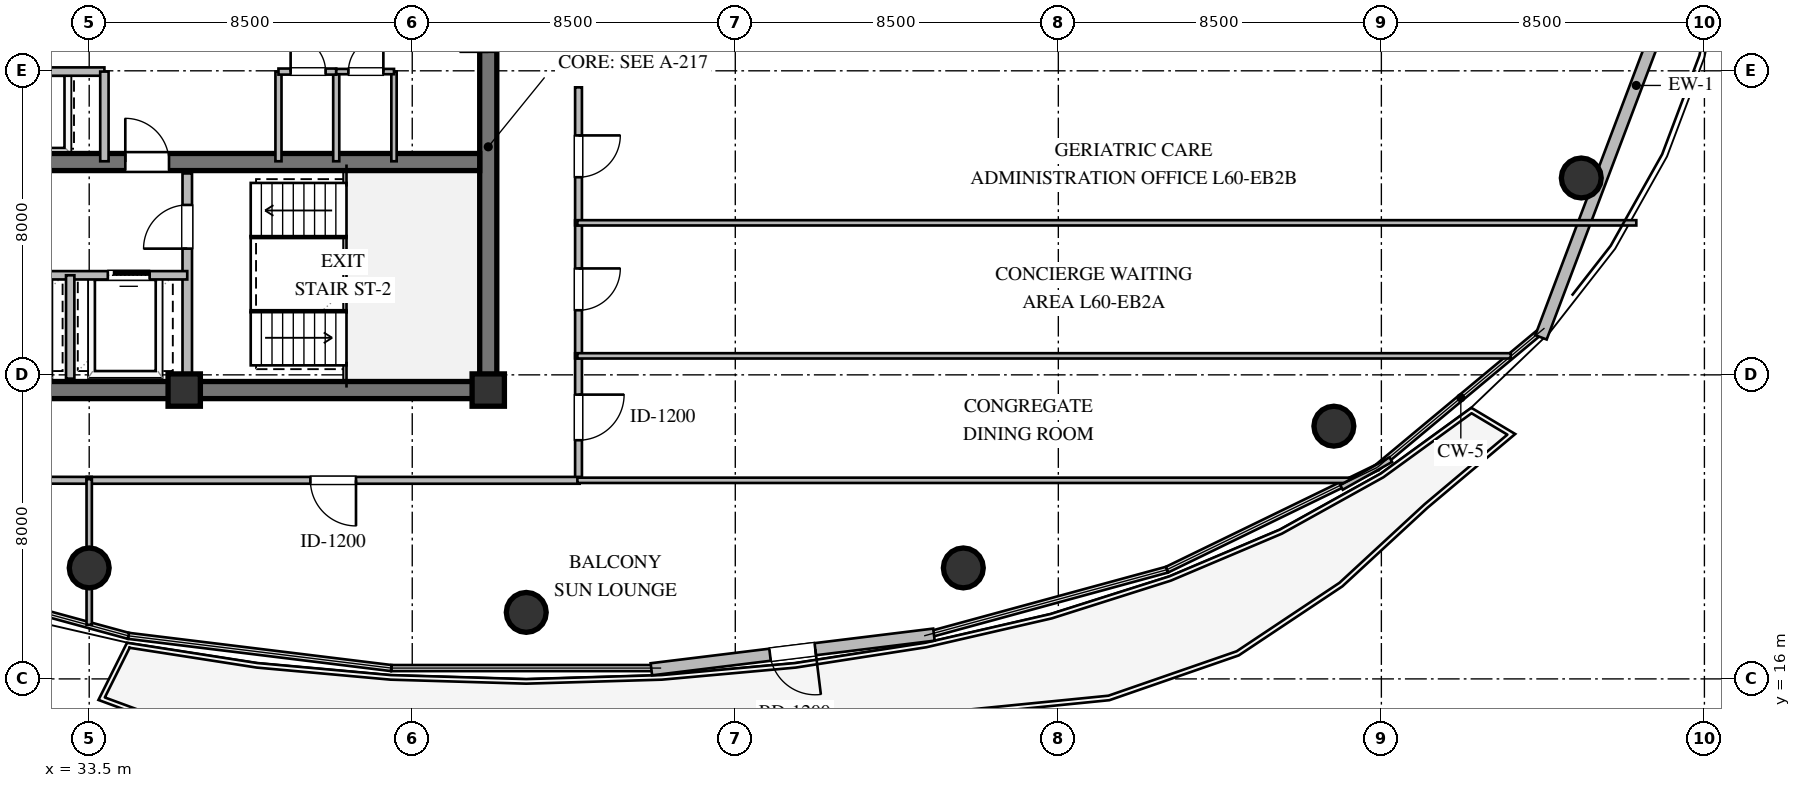
"""IFC4 building model, lengths in metres.
Left out: names, types, materials, properties, quantities, classifications, styles, units other than length and angle.
Written with IfcOpenShell. Run it as: python <this file> out.ifc"""

import sys

from ifc_helpers import new_model, si_unit, direction, frame, frame_2d, origin, origin_2d, place, context, subcontext, project, spatial, rectangle, circle, extrude, element, fill, save


model = new_model("IFC4")
c1 = context("Model", 3, precision=1e-05, world=origin(), true_north=direction((0.0, 1.0)))
c2 = subcontext(c1, "Body", "Model", "MODEL_VIEW")
j1 = project(units=[si_unit("LENGTHUNIT", "METRE"), si_unit("PLANEANGLEUNIT", "RADIAN")], contexts=[c1])
p1 = place(None, origin())
s1 = spatial("IfcSite", under=j1, at=p1, CompositionType="ELEMENT")
p2 = place(p1, origin())
s2 = spatial("IfcBuilding", under=s1, at=p2, CompositionType="ELEMENT")
p3 = place(p2, frame((0.0, 0.0, 228.0)))
s3 = spatial("IfcBuildingStorey", under=s2, at=p3, CompositionType="ELEMENT", Elevation=228.0)
p4 = place(p3, frame((21.775, 23.6, 0.0), z_axis=(0.0, 0.0, 1.0), x_axis=(1.0, 0.0, 0.0)))
e1 = element("IfcWall", 1, at=p4, inside=s3, PredefinedType="SHEAR", context=c2, shape_type="SweptSolid", body=[
    extrude(rectangle(XDim=22.45, YDim=0.45, at=frame_2d((11.225, 0.0))), origin(), (0.0, 0.0, 1.0), 3.36),
])
p5 = place(p3, frame((44.0, 23.825, 0.0), z_axis=(0.0, 0.0, 1.0), x_axis=(0.0, 1.0, 0.0)))
e2 = element("IfcWall", 2, at=p5, inside=s3, PredefinedType="SHEAR", context=c2, shape_type="SweptSolid", body=[
    extrude(rectangle(XDim=12.35, YDim=0.45, at=frame_2d((6.175, 0.0))), origin(), (0.0, 0.0, 1.0), 3.36),
])
p6 = place(p5, frame((8.675, 0.0, 0.0)))
e3 = element("IfcOpeningElement", 3, at=p6, cuts=e2, PredefinedType="OPENING", context=c2, shape_type="SweptSolid", body=[
    extrude(rectangle(XDim=1.5, YDim=2.15, at=frame_2d((0.75, 1.075))), frame((0.0, 0.235, 0.0), z_axis=(0.0, -1.0, 0.0), x_axis=(1.0, 0.0, 0.0)), (0.0, 0.0, 1.0), 0.47),
])
p7 = place(p3, frame((22.225, 29.6, 0.0), z_axis=(0.0, 0.0, 1.0), x_axis=(1.0, 0.0, 0.0)))
e4 = element("IfcWall", 4, at=p7, inside=s3, PredefinedType="SHEAR", context=c2, shape_type="SweptSolid", body=[
    extrude(rectangle(XDim=21.55, YDim=0.45, at=frame_2d((10.775, 0.0))), origin(), (0.0, 0.0, 1.0), 3.36),
])
p8 = place(p7, frame((12.225, 0.0, 0.0)))
e5 = element("IfcOpeningElement", 5, at=p8, cuts=e4, PredefinedType="OPENING", context=c2, shape_type="SweptSolid", body=[
    extrude(rectangle(XDim=1.15, YDim=2.1, at=frame_2d((0.575, 1.05))), frame((0.0, 0.235, 0.0), z_axis=(0.0, -1.0, 0.0), x_axis=(1.0, 0.0, 0.0)), (0.0, 0.0, 1.0), 0.47),
])
for number, where, z_axis, x_axis in (
    (6, (36.0, 23.6, 0.0), (0.0, 0.0, 1.0), (1.0, 0.0, 0.0)),
    (7, (44.0, 23.6, 0.0), (0.0, 0.0, 1.0), (1.0, 0.0, 0.0)),
):
    element("IfcColumn", number, at=place(p3, frame(where, z_axis=z_axis, x_axis=x_axis)), inside=s3, PredefinedType="COLUMN", context=c2, shape_type="SweptSolid", body=[
        extrude(rectangle(XDim=0.85, YDim=0.85, at=origin_2d()), origin(), (0.0, 0.0, 1.0), 3.6),
    ])
for number, where, z_axis, x_axis in (
    (8, (33.5, 18.92, 0.0), (0.0, 0.0, 1.0), (1.0, 0.0, 0.0)),
    (9, (45.0, 17.75, 0.0), (0.0, 0.0, 1.0), (1.0, 0.0, 0.0)),
    (10, (56.5, 18.92, 0.0), (0.0, 0.0, 1.0), (1.0, 0.0, 0.0)),
    (11, (66.25, 22.65, 0.0), (0.0, 0.0, 1.0), (1.0, 0.0, 0.0)),
    (12, (72.76, 29.18, 0.0), (0.0, 0.0, 1.0), (1.0, 0.0, 0.0)),
):
    element("IfcColumn", number, at=place(p3, frame(where, z_axis=z_axis, x_axis=x_axis)), inside=s3, PredefinedType="COLUMN", context=c2, shape_type="SweptSolid", body=[
        extrude(circle(Radius=0.525, at=origin_2d()), origin(), (0.0, 0.0, 1.0), 3.6),
    ])
p9 = place(p3, frame((76.712, 38.243, 0.0), z_axis=(0.0, 0.0, 1.0), x_axis=(-0.353659523244, -0.935374225441, 0.0)))
e13 = element("IfcWall", 13, at=p9, inside=s3, PredefinedType="STANDARD", context=c2, shape_type="SweptSolid", body=[
    extrude(rectangle(XDim=14.172, YDim=0.32, at=frame_2d((7.086, 0.0))), origin(), (0.0, 0.0, 1.0), 3.36),
])
p10 = place(p3, frame((55.727, 17.165, 0.0), z_axis=(0.0, 0.0, 1.0), x_axis=(-0.992559081031, -0.121763995755, 0.0)))
e14 = element("IfcWall", 14, at=p10, inside=s3, PredefinedType="STANDARD", context=c2, shape_type="SweptSolid", body=[
    extrude(rectangle(XDim=7.491, YDim=0.32, at=frame_2d((3.745, 0.0))), origin(), (0.0, 0.0, 1.0), 3.36),
])
p11 = place(p10, frame((3.145, 0.0, 0.0)))
e15 = element("IfcOpeningElement", 15, at=p11, cuts=e14, PredefinedType="OPENING", context=c2, shape_type="SweptSolid", body=[
    extrude(rectangle(XDim=1.2, YDim=2.15, at=frame_2d((0.6, 1.075))), frame((0.0, 0.17, 0.0), z_axis=(0.0, -1.0, 0.0), x_axis=(1.0, 0.0, 0.0)), (0.0, 0.0, 1.0), 0.34),
])
p12 = place(p3, frame((36.08, 23.9, 0.0), z_axis=(0.0, 0.0, 1.0), x_axis=(0.0, 1.0, 0.0)))
e16 = element("IfcWall", 16, at=p12, inside=s3, PredefinedType="SOLIDWALL", context=c2, shape_type="SweptSolid", body=[
    extrude(rectangle(XDim=5.4, YDim=0.25, at=frame_2d((2.7, 0.0))), origin(), (0.0, 0.0, 1.0), 3.36),
])
p13 = place(p12, frame((3.421, 0.0, 0.0)))
e17 = element("IfcOpeningElement", 17, at=p13, cuts=e16, PredefinedType="OPENING", context=c2, shape_type="SweptSolid", body=[
    extrude(rectangle(XDim=1.15, YDim=2.1, at=frame_2d((0.575, 1.05))), frame((0.0, 0.135, 0.0), z_axis=(0.0, -1.0, 0.0), x_axis=(1.0, 0.0, 0.0)), (0.0, 0.0, 1.0), 0.27),
])
p14 = place(p3, frame((29.92, 26.62, 0.0), z_axis=(0.0, 0.0, 1.0), x_axis=(1.0, 0.0, 0.0)))
e18 = element("IfcWall", 18, at=p14, inside=s3, PredefinedType="SOLIDWALL", context=c2, shape_type="SweptSolid", body=[
    extrude(rectangle(XDim=6.16, YDim=0.22, at=frame_2d((3.08, 0.0))), origin(), (0.0, 0.0, 1.0), 3.36),
])
p15 = place(p14, frame((0.99, 0.0, 0.0)))
e19 = element("IfcOpeningElement", 19, at=p15, cuts=e18, PredefinedType="OPENING", context=c2, shape_type="SweptSolid", body=[
    extrude(rectangle(XDim=1.1, YDim=2.1, at=frame_2d((0.55, 1.05))), frame((0.0, 0.12, 0.0), z_axis=(0.0, -1.0, 0.0), x_axis=(1.0, 0.0, 0.0)), (0.0, 0.0, 1.0), 0.24),
])
p16 = place(p14, frame((4.07, 0.0, 0.0)))
e20 = element("IfcOpeningElement", 20, at=p16, cuts=e18, PredefinedType="OPENING", context=c2, shape_type="SweptSolid", body=[
    extrude(rectangle(XDim=1.1, YDim=2.1, at=frame_2d((0.55, 1.05))), frame((0.0, 0.12, 0.0), z_axis=(0.0, -1.0, 0.0), x_axis=(1.0, 0.0, 0.0)), (0.0, 0.0, 1.0), 0.24),
])
p17 = place(p3, frame((33.0, 23.9, 0.0), z_axis=(0.0, 0.0, 1.0), x_axis=(0.0, 1.0, 0.0)))
e21 = element("IfcWall", 21, at=p17, inside=s3, PredefinedType="SOLIDWALL", context=c2, shape_type="SweptSolid", body=[
    extrude(rectangle(XDim=2.72, YDim=0.22, at=frame_2d((1.36, 0.0))), origin(), (0.0, 0.0, 1.0), 3.36),
])
p18 = place(p3, frame((26.1, 31.98, 0.0), z_axis=(0.0, 0.0, 1.0), x_axis=(1.0, 0.0, 0.0)))
e22 = element("IfcWall", 22, at=p18, inside=s3, PredefinedType="SOLIDWALL", context=c2, shape_type="SweptSolid", body=[
    extrude(rectangle(XDim=7.8, YDim=0.22, at=frame_2d((3.9, 0.0))), origin(), (0.0, 0.0, 1.0), 3.36),
])
p19 = place(p18, frame((1.4, 0.0, 0.0)))
e23 = element("IfcOpeningElement", 23, at=p19, cuts=e22, PredefinedType="OPENING", context=c2, shape_type="SweptSolid", body=[
    extrude(rectangle(XDim=1.1, YDim=2.1, at=frame_2d((0.55, 1.05))), frame((0.0, 0.12, 0.0), z_axis=(0.0, -1.0, 0.0), x_axis=(1.0, 0.0, 0.0)), (0.0, 0.0, 1.0), 0.24),
])
p20 = place(p18, frame((5.066, 0.0, 0.0)))
e24 = element("IfcOpeningElement", 24, at=p20, cuts=e22, PredefinedType="OPENING", context=c2, shape_type="SweptSolid", body=[
    extrude(rectangle(XDim=1.1, YDim=2.1, at=frame_2d((0.55, 1.05))), frame((0.0, 0.12, 0.0), z_axis=(0.0, -1.0, 0.0), x_axis=(1.0, 0.0, 0.0)), (0.0, 0.0, 1.0), 0.24),
])
p21 = place(p3, frame((33.9, 29.62, 0.0), z_axis=(0.0, 0.0, 1.0), x_axis=(0.0, 1.0, 0.0)))
e25 = element("IfcWall", 25, at=p21, inside=s3, PredefinedType="SOLIDWALL", context=c2, shape_type="SweptSolid", body=[
    extrude(rectangle(XDim=2.36, YDim=0.22, at=frame_2d((1.18, 0.0))), origin(), (0.0, 0.0, 1.0), 3.36),
])
for number, where, z_axis, x_axis in (
    (26, (38.48, 29.62, 0.0), (0.0, 0.0, 1.0), (0.0, 1.0, 0.0)),
    (27, (40.0, 29.62, 0.0), (0.0, 0.0, 1.0), (0.0, 1.0, 0.0)),
):
    element("IfcWall", number, at=place(p3, frame(where, z_axis=z_axis, x_axis=x_axis)), inside=s3, PredefinedType="PLUMBINGWALL", context=c2, shape_type="SweptSolid", body=[
        extrude(rectangle(XDim=2.36, YDim=0.16, at=frame_2d((1.18, 0.0))), origin(), (0.0, 0.0, 1.0), 3.36),
    ])
p22 = place(p3, frame((41.52, 29.62, 0.0), z_axis=(0.0, 0.0, 1.0), x_axis=(0.0, 1.0, 0.0)))
e28 = element("IfcWall", 28, at=p22, inside=s3, PredefinedType="PARTITIONING", context=c2, shape_type="SweptSolid", body=[
    extrude(rectangle(XDim=2.36, YDim=0.14, at=frame_2d((1.18, 0.0))), origin(), (0.0, 0.0, 1.0), 3.36),
])
p23 = place(p3, frame((38.48, 31.98, 0.0), z_axis=(0.0, 0.0, 1.0), x_axis=(1.0, 0.0, 0.0)))
e29 = element("IfcWall", 29, at=p23, inside=s3, PredefinedType="PLUMBINGWALL", context=c2, shape_type="SweptSolid", body=[
    extrude(rectangle(XDim=1.52, YDim=0.16, at=frame_2d((0.76, 0.0))), origin(), (0.0, 0.0, 1.0), 3.36),
])
p24 = place(p23, frame((0.32, 0.0, 0.0)))
e30 = element("IfcOpeningElement", 30, at=p24, cuts=e29, PredefinedType="OPENING", context=c2, shape_type="SweptSolid", body=[
    extrude(rectangle(XDim=0.92, YDim=2.1, at=frame_2d((0.46, 1.05))), frame((0.0, 0.09, 0.0), z_axis=(0.0, -1.0, 0.0), x_axis=(1.0, 0.0, 0.0)), (0.0, 0.0, 1.0), 0.18),
])
p25 = place(p3, frame((40.0, 31.98, 0.0), z_axis=(0.0, 0.0, 1.0), x_axis=(1.0, 0.0, 0.0)))
e31 = element("IfcWall", 31, at=p25, inside=s3, PredefinedType="PARTITIONING", context=c2, shape_type="SweptSolid", body=[
    extrude(rectangle(XDim=1.52, YDim=0.14, at=frame_2d((0.76, 0.0))), origin(), (0.0, 0.0, 1.0), 3.36),
])
p26 = place(p25, frame((0.32, 0.0, 0.0)))
e32 = element("IfcOpeningElement", 32, at=p26, cuts=e31, PredefinedType="OPENING", context=c2, shape_type="SweptSolid", body=[
    extrude(rectangle(XDim=0.92, YDim=2.1, at=frame_2d((0.46, 1.05))), frame((0.0, 0.08, 0.0), z_axis=(0.0, -1.0, 0.0), x_axis=(1.0, 0.0, 0.0)), (0.0, 0.0, 1.0), 0.16),
])
p27 = place(p3, frame((46.375, 24.565, 0.0), z_axis=(0.0, 0.0, 1.0), x_axis=(0.0, -1.0, 0.0)))
e33 = element("IfcWall", 33, at=p27, inside=s3, PredefinedType="PARTITIONING", context=c2, shape_type="SweptSolid", body=[
    extrude(rectangle(XDim=3.37, YDim=0.18, at=frame_2d((1.685, 0.0))), origin(), (0.0, 0.0, 1.0), 3.36),
])
p28 = place(p27, frame((1.085, 0.0, 0.0)))
e34 = element("IfcOpeningElement", 34, at=p28, cuts=e33, PredefinedType="OPENING", context=c2, shape_type="SweptSolid", body=[
    extrude(rectangle(XDim=1.2, YDim=2.15, at=frame_2d((0.6, 1.075))), frame((0.0, 0.1, 0.0), z_axis=(0.0, -1.0, 0.0), x_axis=(1.0, 0.0, 0.0)), (0.0, 0.0, 1.0), 0.2),
])
p29 = place(p3, frame((46.375, 28.065, 0.0), z_axis=(0.0, 0.0, 1.0), x_axis=(0.0, -1.0, 0.0)))
e35 = element("IfcWall", 35, at=p29, inside=s3, PredefinedType="PARTITIONING", context=c2, shape_type="SweptSolid", body=[
    extrude(rectangle(XDim=3.63, YDim=0.18, at=frame_2d((1.815, 0.0))), origin(), (0.0, 0.0, 1.0), 3.36),
])
p30 = place(p29, frame((1.265, 0.0, 0.0)))
e36 = element("IfcOpeningElement", 36, at=p30, cuts=e35, PredefinedType="OPENING", context=c2, shape_type="SweptSolid", body=[
    extrude(rectangle(XDim=1.1, YDim=2.1, at=frame_2d((0.55, 1.05))), frame((0.0, 0.1, 0.0), z_axis=(0.0, -1.0, 0.0), x_axis=(1.0, 0.0, 0.0)), (0.0, 0.0, 1.0), 0.2),
])
p31 = place(p3, frame((46.375, 31.565, 0.0), z_axis=(0.0, 0.0, 1.0), x_axis=(0.0, -1.0, 0.0)))
e37 = element("IfcWall", 37, at=p31, inside=s3, PredefinedType="PARTITIONING", context=c2, shape_type="SweptSolid", body=[
    extrude(rectangle(XDim=3.63, YDim=0.18, at=frame_2d((1.815, 0.0))), origin(), (0.0, 0.0, 1.0), 3.36),
])
p32 = place(p31, frame((1.265, 0.0, 0.0)))
e38 = element("IfcOpeningElement", 38, at=p32, cuts=e37, PredefinedType="OPENING", context=c2, shape_type="SweptSolid", body=[
    extrude(rectangle(XDim=1.1, YDim=2.1, at=frame_2d((0.55, 1.05))), frame((0.0, 0.1, 0.0), z_axis=(0.0, -1.0, 0.0), x_axis=(1.0, 0.0, 0.0)), (0.0, 0.0, 1.0), 0.2),
])
p33 = place(p3, frame((33.565, 21.225, 0.0), z_axis=(0.0, 0.0, 1.0), x_axis=(-0.999998619279, 0.001661758222, 0.0)))
e39 = element("IfcWall", 39, at=p33, inside=s3, PredefinedType="PARTITIONING", context=c2, shape_type="SweptSolid", body=[
    extrude(rectangle(XDim=10.284, YDim=0.18, at=frame_2d((5.142, 0.0))), origin(), (0.0, 0.0, 1.0), 2.806),
])
p34 = place(p33, frame((6.229, 0.0, 0.0)))
e40 = element("IfcOpeningElement", 40, at=p34, cuts=e39, PredefinedType="OPENING", context=c2, shape_type="SweptSolid", body=[
    extrude(rectangle(XDim=1.1, YDim=2.1, at=frame_2d((0.55, 1.05))), frame((0.0, 0.1, 0.0), z_axis=(0.0, -1.0, 0.0), x_axis=(1.0, 0.0, 0.0)), (0.0, 0.0, 1.0), 0.2),
])
p35 = place(p3, frame((46.405, 21.225, 0.0), z_axis=(0.0, 0.0, 1.0), x_axis=(-1.0, 0.0, 0.0)))
e41 = element("IfcWall", 41, at=p35, inside=s3, PredefinedType="PARTITIONING", context=c2, shape_type="SweptSolid", body=[
    extrude(rectangle(XDim=12.97, YDim=0.18, at=frame_2d((6.485, 0.0))), origin(), (0.0, 0.0, 1.0), 2.996),
])
p36 = place(p35, frame((5.885, 0.0, 0.0)))
e42 = element("IfcOpeningElement", 42, at=p36, cuts=e41, PredefinedType="OPENING", context=c2, shape_type="SweptSolid", body=[
    extrude(rectangle(XDim=1.2, YDim=2.15, at=frame_2d((0.6, 1.075))), frame((0.0, 0.1, 0.0), z_axis=(0.0, -1.0, 0.0), x_axis=(1.0, 0.0, 0.0)), (0.0, 0.0, 1.0), 0.2),
])
p37 = place(p3, frame((46.345, 24.5, 0.0), z_axis=(0.0, 0.0, 1.0), x_axis=(1.0, 0.0, 0.0)))
e43 = element("IfcWall", 43, at=p37, inside=s3, PredefinedType="PARTITIONING", context=c2, shape_type="SweptSolid", body=[
    extrude(rectangle(XDim=24.561, YDim=0.14, at=frame_2d((12.28, 0.0))), origin(), (0.0, 0.0, 1.0), 2.806),
])
p38 = place(p3, frame((66.684, 21.225, 0.0), z_axis=(0.0, 0.0, 1.0), x_axis=(-1.0, 0.0, 0.0)))
e44 = element("IfcWall", 44, at=p38, inside=s3, PredefinedType="PARTITIONING", context=c2, shape_type="SweptSolid", body=[
    extrude(rectangle(XDim=20.339, YDim=0.14, at=frame_2d((10.169, 0.0))), origin(), (0.0, 0.0, 1.0), 2.996),
])
p39 = place(p3, frame((67.748, 21.77, 0.0), z_axis=(0.0, 0.0, 1.0), x_axis=(-0.871352238731, -0.490658003153, 0.0)))
e45 = element("IfcWall", 45, at=p39, inside=s3, PredefinedType="PARTITIONING", context=c2, shape_type="SweptSolid", body=[
    extrude(rectangle(XDim=1.49, YDim=0.14, at=frame_2d((0.745, 0.0))), origin(), (0.0, 0.0, 1.0), 3.36),
])
p40 = place(p3, frame((46.345, 28.0, 0.0), z_axis=(0.0, 0.0, 1.0), x_axis=(1.0, 0.0, 0.0)))
e46 = element("IfcWall", 46, at=p40, inside=s3, PredefinedType="PARTITIONING", context=c2, shape_type="SweptSolid", body=[
    extrude(rectangle(XDim=27.863, YDim=0.14, at=frame_2d((13.932, 0.0))), origin(), (0.0, 0.0, 1.0), 2.806),
])
p41 = place(p3, frame((33.5, 21.255, 0.0), z_axis=(0.0, 0.0, 1.0), x_axis=(0.0, -1.0, 0.0)))
e47 = element("IfcWall", 47, at=p41, inside=s3, PredefinedType="PARTITIONING", context=c2, shape_type="SweptSolid", body=[
    extrude(rectangle(XDim=3.831, YDim=0.14, at=frame_2d((1.916, 0.0))), origin(), (0.0, 0.0, 1.0), 3.36),
])
p42 = place(p11, origin())
e48 = element("IfcDoor", 48, at=p42, inside=s3, OperationType="SINGLE_SWING_LEFT", PredefinedType="DOOR", context=c2, shape_type="SweptSolid", body=[
    extrude(rectangle(XDim=1.2, YDim=2.15, at=frame_2d((0.6, 1.075))), frame((0.0, 0.025, 0.0), z_axis=(0.0, -1.0, 0.0), x_axis=(1.0, 0.0, 0.0)), (0.0, 0.0, 1.0), 0.05),
])
fill(e15, e48)
p43 = place(p13, origin())
e49 = element("IfcDoor", 49, at=p43, inside=s3, OperationType="SINGLE_SWING_LEFT", PredefinedType="DOOR", context=c2, shape_type="SweptSolid", body=[
    extrude(rectangle(XDim=1.15, YDim=2.1, at=frame_2d((0.575, 1.05))), frame((0.0, 0.025, 0.0), z_axis=(0.0, -1.0, 0.0), x_axis=(1.0, 0.0, 0.0)), (0.0, 0.0, 1.0), 0.05),
])
fill(e17, e49)
p44 = place(p16, origin())
e50 = element("IfcDoor", 50, at=p44, inside=s3, OperationType="SLIDING_TO_RIGHT", PredefinedType="DOOR", context=c2, shape_type="SweptSolid", body=[
    extrude(rectangle(XDim=1.1, YDim=2.1, at=frame_2d((0.55, 1.05))), frame((0.0, 0.025, 0.0), z_axis=(0.0, -1.0, 0.0), x_axis=(1.0, 0.0, 0.0)), (0.0, 0.0, 1.0), 0.05),
])
fill(e20, e50)
p45 = place(p8, origin())
e51 = element("IfcDoor", 51, at=p45, inside=s3, OperationType="SINGLE_SWING_LEFT", PredefinedType="DOOR", context=c2, shape_type="SweptSolid", body=[
    extrude(rectangle(XDim=1.15, YDim=2.1, at=frame_2d((0.575, 1.05))), frame((0.0, 0.025, 0.0), z_axis=(0.0, -1.0, 0.0), x_axis=(1.0, 0.0, 0.0)), (0.0, 0.0, 1.0), 0.05),
])
fill(e5, e51)
p46 = place(p24, origin())
e52 = element("IfcDoor", 52, at=p46, inside=s3, OperationType="SINGLE_SWING_LEFT", PredefinedType="DOOR", context=c2, shape_type="SweptSolid", body=[
    extrude(rectangle(XDim=0.92, YDim=2.1, at=frame_2d((0.46, 1.05))), frame((0.0, 0.025, 0.0), z_axis=(0.0, -1.0, 0.0), x_axis=(1.0, 0.0, 0.0)), (0.0, 0.0, 1.0), 0.05),
])
fill(e30, e52)
p47 = place(p26, origin())
e53 = element("IfcDoor", 53, at=p47, inside=s3, OperationType="SINGLE_SWING_RIGHT", PredefinedType="DOOR", context=c2, shape_type="SweptSolid", body=[
    extrude(rectangle(XDim=0.92, YDim=2.1, at=frame_2d((0.46, 1.05))), frame((0.0, 0.025, 0.0), z_axis=(0.0, -1.0, 0.0), x_axis=(1.0, 0.0, 0.0)), (0.0, 0.0, 1.0), 0.05),
])
fill(e32, e53)
p48 = place(p28, origin())
e54 = element("IfcDoor", 54, at=p48, inside=s3, OperationType="SINGLE_SWING_LEFT", PredefinedType="DOOR", context=c2, shape_type="SweptSolid", body=[
    extrude(rectangle(XDim=1.2, YDim=2.15, at=frame_2d((0.6, 1.075))), frame((0.0, 0.025, 0.0), z_axis=(0.0, -1.0, 0.0), x_axis=(1.0, 0.0, 0.0)), (0.0, 0.0, 1.0), 0.05),
])
fill(e34, e54)
p49 = place(p30, origin())
e55 = element("IfcDoor", 55, at=p49, inside=s3, OperationType="SINGLE_SWING_LEFT", PredefinedType="DOOR", context=c2, shape_type="SweptSolid", body=[
    extrude(rectangle(XDim=1.1, YDim=2.1, at=frame_2d((0.55, 1.05))), frame((0.0, 0.025, 0.0), z_axis=(0.0, -1.0, 0.0), x_axis=(1.0, 0.0, 0.0)), (0.0, 0.0, 1.0), 0.05),
])
fill(e36, e55)
p50 = place(p32, origin())
e56 = element("IfcDoor", 56, at=p50, inside=s3, OperationType="SINGLE_SWING_LEFT", PredefinedType="DOOR", context=c2, shape_type="SweptSolid", body=[
    extrude(rectangle(XDim=1.1, YDim=2.1, at=frame_2d((0.55, 1.05))), frame((0.0, 0.025, 0.0), z_axis=(0.0, -1.0, 0.0), x_axis=(1.0, 0.0, 0.0)), (0.0, 0.0, 1.0), 0.05),
])
fill(e38, e56)
p51 = place(p36, origin())
e57 = element("IfcDoor", 57, at=p51, inside=s3, OperationType="SINGLE_SWING_LEFT", PredefinedType="DOOR", context=c2, shape_type="SweptSolid", body=[
    extrude(rectangle(XDim=1.2, YDim=2.15, at=frame_2d((0.6, 1.075))), frame((0.0, 0.025, 0.0), z_axis=(0.0, -1.0, 0.0), x_axis=(1.0, 0.0, 0.0)), (0.0, 0.0, 1.0), 0.05),
])
fill(e42, e57)
save(model, sys.argv[1])
